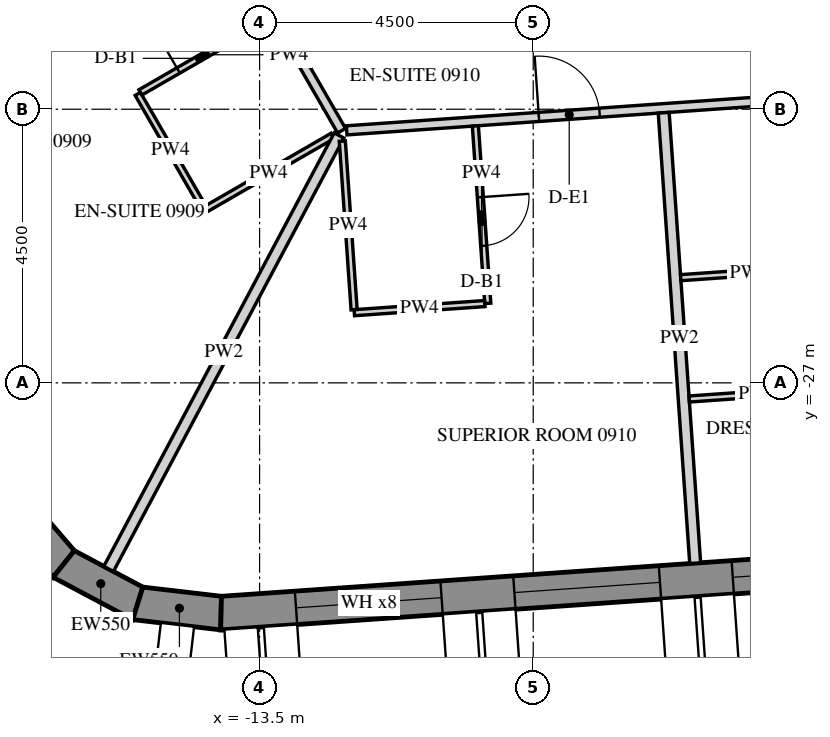
"""IFC4 building model, lengths in metres.
Left out: names, types, materials, properties, quantities, classifications, styles, units other than length and angle.
Written with IfcOpenShell. Run it as: python <this file> out.ifc"""

import sys

from ifc_helpers import new_model, si_unit, direction, frame, frame_2d, origin, place, context, subcontext, project, spatial, polyline, rectangle, outline, extrude, element, fill, save


model = new_model("IFC4")
c1 = context("Model", 3, precision=1e-05, world=origin(), true_north=direction((0.0, 1.0)))
c2 = subcontext(c1, "Body", "Model", "MODEL_VIEW")
j1 = project(units=[si_unit("LENGTHUNIT", "METRE"), si_unit("PLANEANGLEUNIT", "RADIAN")], contexts=[c1])
p1 = place(None, origin())
s1 = spatial("IfcSite", under=j1, at=p1, CompositionType="ELEMENT")
p2 = place(p1, origin())
s2 = spatial("IfcBuilding", under=s1, at=p2, CompositionType="ELEMENT")
p3 = place(p2, frame((0.0, 0.0, 123.3)))
s3 = spatial("IfcBuildingStorey", under=s2, at=p3, CompositionType="ELEMENT", Elevation=123.3)
p4 = place(p3, frame((-17.619, -28.932, -0.15), z_axis=(0.0, 0.0, 1.0), x_axis=(0.651621950847, -0.758543890078, 0.0)))
e1 = element("IfcWall", 1, at=p4, inside=s3, PredefinedType="SOLIDWALL", context=c2, shape_type="SweptSolid", body=[
    extrude(outline(polyline([(-0.026, -0.275), (1.431, -0.275), (1.327, 0.275), (0.026, 0.275), (-0.026, -0.275)])), origin(), (0.0, 0.0, 1.0), 3.9),
])
p5 = place(p3, frame((-16.721, -29.979, -0.15), z_axis=(0.0, 0.0, 1.0), x_axis=(0.882994189209, -0.469383917304, 0.0)))
e2 = element("IfcWall", 2, at=p5, inside=s3, PredefinedType="SOLIDWALL", context=c2, shape_type="SweptSolid", body=[
    extrude(outline(polyline([(-0.052, -0.275), (1.431, -0.275), (1.327, 0.275), (0.052, 0.275), (-0.052, -0.275)])), origin(), (0.0, 0.0, 1.0), 3.9),
])
p6 = place(p3, frame((-15.503, -30.626, -0.15), z_axis=(0.0, 0.0, 1.0), x_axis=(0.993232537394, -0.11614269956, 0.0)))
e3 = element("IfcWall", 3, at=p6, inside=s3, PredefinedType="SOLIDWALL", context=c2, shape_type="SweptSolid", body=[
    extrude(outline(polyline([(-0.052, -0.275), (1.405, -0.275), (1.353, 0.275), (0.052, 0.275), (-0.052, -0.275)])), origin(), (0.0, 0.0, 1.0), 3.9),
])
p7 = place(p3, frame((-14.134, -30.786, -0.15), z_axis=(0.0, 0.0, 1.0), x_axis=(0.997564037441, 0.069756657061, 0.0)))
e4 = element("IfcWall", 4, at=p7, inside=s3, PredefinedType="SOLIDWALL", context=c2, shape_type="SweptSolid", body=[
    extrude(outline(polyline([(-0.026, -0.275), (30.094, -0.275), (30.049, 0.275), (0.026, 0.275), (-0.026, -0.275)])), origin(), (0.0, 0.0, 1.0), 3.9),
])
p8 = place(p7, frame((1.236, 0.0, 1.05)))
e5 = element("IfcOpeningElement", 5, at=p8, cuts=e4, PredefinedType="OPENING", context=c2, shape_type="SweptSolid", body=[
    extrude(rectangle(XDim=2.4, YDim=2.4, at=frame_2d((1.2, 1.2))), frame((0.0, 0.285, 0.0), z_axis=(0.0, -1.0, 0.0), x_axis=(1.0, 0.0, 0.0)), (0.0, 0.0, 1.0), 0.57),
])
p9 = place(p7, frame((4.835, 0.0, 1.05)))
e6 = element("IfcOpeningElement", 6, at=p9, cuts=e4, PredefinedType="OPENING", context=c2, shape_type="SweptSolid", body=[
    extrude(rectangle(XDim=2.4, YDim=2.4, at=frame_2d((1.2, 1.2))), frame((0.0, 0.285, 0.0), z_axis=(0.0, -1.0, 0.0), x_axis=(1.0, 0.0, 0.0)), (0.0, 0.0, 1.0), 0.57),
])
p10 = place(p7, frame((8.436, 0.0, 1.05)))
e7 = element("IfcOpeningElement", 7, at=p10, cuts=e4, PredefinedType="OPENING", context=c2, shape_type="SweptSolid", body=[
    extrude(rectangle(XDim=2.4, YDim=2.4, at=frame_2d((1.2, 1.2))), frame((0.0, 0.285, 0.0), z_axis=(0.0, -1.0, 0.0), x_axis=(1.0, 0.0, 0.0)), (0.0, 0.0, 1.0), 0.57),
])
p11 = place(p7, frame((12.035, 0.0, 1.05)))
e8 = element("IfcOpeningElement", 8, at=p11, cuts=e4, PredefinedType="OPENING", context=c2, shape_type="SweptSolid", body=[
    extrude(rectangle(XDim=2.4, YDim=2.4, at=frame_2d((1.2, 1.2))), frame((0.0, 0.285, 0.0), z_axis=(0.0, -1.0, 0.0), x_axis=(1.0, 0.0, 0.0)), (0.0, 0.0, 1.0), 0.57),
])
p12 = place(p7, frame((15.635, 0.0, 1.05)))
e9 = element("IfcOpeningElement", 9, at=p12, cuts=e4, PredefinedType="OPENING", context=c2, shape_type="SweptSolid", body=[
    extrude(rectangle(XDim=2.4, YDim=2.4, at=frame_2d((1.2, 1.2))), frame((0.0, 0.285, 0.0), z_axis=(0.0, -1.0, 0.0), x_axis=(1.0, 0.0, 0.0)), (0.0, 0.0, 1.0), 0.57),
])
p13 = place(p7, frame((19.236, 0.0, 1.05)))
e10 = element("IfcOpeningElement", 10, at=p13, cuts=e4, PredefinedType="OPENING", context=c2, shape_type="SweptSolid", body=[
    extrude(rectangle(XDim=2.4, YDim=2.4, at=frame_2d((1.2, 1.2))), frame((0.0, 0.285, 0.0), z_axis=(0.0, -1.0, 0.0), x_axis=(1.0, 0.0, 0.0)), (0.0, 0.0, 1.0), 0.57),
])
p14 = place(p7, frame((22.835, 0.0, 1.05)))
e11 = element("IfcOpeningElement", 11, at=p14, cuts=e4, PredefinedType="OPENING", context=c2, shape_type="SweptSolid", body=[
    extrude(rectangle(XDim=2.4, YDim=2.4, at=frame_2d((1.2, 1.2))), frame((0.0, 0.285, 0.0), z_axis=(0.0, -1.0, 0.0), x_axis=(1.0, 0.0, 0.0)), (0.0, 0.0, 1.0), 0.57),
])
p15 = place(p7, frame((26.436, 0.0, 1.05)))
e12 = element("IfcOpeningElement", 12, at=p15, cuts=e4, PredefinedType="OPENING", context=c2, shape_type="SweptSolid", body=[
    extrude(rectangle(XDim=2.4, YDim=2.4, at=frame_2d((1.2, 1.2))), frame((0.0, 0.285, 0.0), z_axis=(0.0, -1.0, 0.0), x_axis=(1.0, 0.0, 0.0)), (0.0, 0.0, 1.0), 0.57),
])
p16 = place(p3, frame((-24.09, -2.175, 0.0), z_axis=(0.0, 0.0, 1.0), x_axis=(0.499996832073, -0.86602723278, 0.0)))
e13 = element("IfcWall", 13, at=p16, inside=s3, PredefinedType="PARTITIONING", context=c2, shape_type="SweptSolid", body=[
    extrude(rectangle(XDim=23.877, YDim=0.15, at=frame_2d((11.938, 0.0))), origin(), (0.0, 0.0, 1.0), 2.988),
])
p17 = place(p16, frame((6.343, 0.0, 0.0)))
e14 = element("IfcOpeningElement", 14, at=p17, cuts=e13, PredefinedType="OPENING", context=c2, shape_type="SweptSolid", body=[
    extrude(rectangle(XDim=1.0, YDim=2.1, at=frame_2d((0.5, 1.05))), frame((0.0, 0.085, 0.0), z_axis=(0.0, -1.0, 0.0), x_axis=(1.0, 0.0, 0.0)), (0.0, 0.0, 1.0), 0.17),
])
p18 = place(p16, frame((13.172, 0.0, 0.0)))
e15 = element("IfcOpeningElement", 15, at=p18, cuts=e13, PredefinedType="OPENING", context=c2, shape_type="SweptSolid", body=[
    extrude(rectangle(XDim=1.0, YDim=2.1, at=frame_2d((0.5, 1.05))), frame((0.0, 0.085, 0.0), z_axis=(0.0, -1.0, 0.0), x_axis=(1.0, 0.0, 0.0)), (0.0, 0.0, 1.0), 0.17),
])
p19 = place(p16, frame((19.625, 0.0, 0.0)))
e16 = element("IfcOpeningElement", 16, at=p19, cuts=e13, PredefinedType="OPENING", context=c2, shape_type="SweptSolid", body=[
    extrude(rectangle(XDim=1.0, YDim=2.1, at=frame_2d((0.5, 1.05))), frame((0.0, 0.085, 0.0), z_axis=(0.0, -1.0, 0.0), x_axis=(1.0, 0.0, 0.0)), (0.0, 0.0, 1.0), 0.17),
])
p20 = place(p3, frame((-12.068, -22.847, 0.0), z_axis=(0.0, 0.0, 1.0), x_axis=(0.99756437486, 0.069751831595, 0.0)))
e17 = element("IfcWall", 17, at=p20, inside=s3, PredefinedType="PARTITIONING", context=c2, shape_type="SweptSolid", body=[
    extrude(rectangle(XDim=22.002, YDim=0.15, at=frame_2d((11.001, 0.0))), origin(), (0.0, 0.0, 1.0), 2.988),
])
p21 = place(p20, frame((3.169, 0.0, 0.0)))
e18 = element("IfcOpeningElement", 18, at=p21, cuts=e17, PredefinedType="OPENING", context=c2, shape_type="SweptSolid", body=[
    extrude(rectangle(XDim=1.0, YDim=2.1, at=frame_2d((0.5, 1.05))), frame((0.0, 0.085, 0.0), z_axis=(0.0, -1.0, 0.0), x_axis=(1.0, 0.0, 0.0)), (0.0, 0.0, 1.0), 0.17),
])
p22 = place(p20, frame((13.121, 0.0, 0.0)))
e19 = element("IfcOpeningElement", 19, at=p22, cuts=e17, PredefinedType="OPENING", context=c2, shape_type="SweptSolid", body=[
    extrude(rectangle(XDim=1.0, YDim=2.1, at=frame_2d((0.5, 1.05))), frame((0.0, 0.085, 0.0), z_axis=(0.0, -1.0, 0.0), x_axis=(1.0, 0.0, 0.0)), (0.0, 0.0, 1.0), 0.17),
])
p23 = place(p20, frame((20.852, 0.0, 0.0)))
e20 = element("IfcOpeningElement", 20, at=p23, cuts=e17, PredefinedType="OPENING", context=c2, shape_type="SweptSolid", body=[
    extrude(rectangle(XDim=1.0, YDim=2.1, at=frame_2d((0.5, 1.05))), frame((0.0, 0.085, 0.0), z_axis=(0.0, -1.0, 0.0), x_axis=(1.0, 0.0, 0.0)), (0.0, 0.0, 1.0), 0.17),
])
p24 = place(p3, frame((-21.299, -22.009, 0.0), z_axis=(0.0, 0.0, 1.0), x_axis=(0.866014745021, 0.500018461065, 0.0)))
e21 = element("IfcWall", 21, at=p24, inside=s3, PredefinedType="PARTITIONING", context=c2, shape_type="SweptSolid", body=[
    extrude(rectangle(XDim=7.425, YDim=0.18, at=frame_2d((3.712, 0.0))), origin(), (0.0, 0.0, 1.0), 2.988),
])
p25 = place(p3, frame((-12.3, -22.939, 0.0), z_axis=(0.0, 0.0, 1.0), x_axis=(-0.866044985707, -0.499966081581, 0.0)))
e22 = element("IfcWall", 22, at=p25, inside=s3, PredefinedType="PARTITIONING", context=c2, shape_type="SweptSolid", body=[
    extrude(rectangle(XDim=2.429, YDim=0.1, at=frame_2d((1.214, 0.0))), origin(), (0.0, 0.0, 1.0), 2.988),
])
p26 = place(p3, frame((-14.428, -24.11, 0.0), z_axis=(0.0, 0.0, 1.0), x_axis=(-0.499961633463, 0.866047553582, 0.0)))
e23 = element("IfcWall", 23, at=p26, inside=s3, PredefinedType="PARTITIONING", context=c2, shape_type="SweptSolid", body=[
    extrude(rectangle(XDim=2.15, YDim=0.1, at=frame_2d((1.075, 0.0))), origin(), (0.0, 0.0, 1.0), 2.988),
])
p27 = place(p3, frame((-15.46, -22.223, 0.0), z_axis=(0.0, 0.0, 1.0), x_axis=(0.866031185235, 0.4999899861, 0.0)))
e24 = element("IfcWall", 24, at=p27, inside=s3, PredefinedType="PARTITIONING", context=c2, shape_type="SweptSolid", body=[
    extrude(rectangle(XDim=2.475, YDim=0.1, at=frame_2d((1.238, 0.0))), origin(), (0.0, 0.0, 1.0), 2.988),
])
p28 = place(p27, frame((0.72, 0.0, 0.0)))
e25 = element("IfcOpeningElement", 25, at=p28, cuts=e24, PredefinedType="OPENING", context=c2, shape_type="SweptSolid", body=[
    extrude(rectangle(XDim=0.8, YDim=2.1, at=frame_2d((0.4, 1.05))), frame((0.0, 0.06, 0.0), z_axis=(0.0, -1.0, 0.0), x_axis=(1.0, 0.0, 0.0)), (0.0, 0.0, 1.0), 0.12),
])
p29 = place(p3, frame((-15.983, -30.059, 0.0), z_axis=(0.0, 0.0, 1.0), x_axis=(0.469476547643, 0.882944942346, 0.0)))
e26 = element("IfcWall", 26, at=p29, inside=s3, PredefinedType="PARTITIONING", context=c2, shape_type="SweptSolid", body=[
    extrude(rectangle(XDim=8.073, YDim=0.18, at=frame_2d((4.037, 0.0))), origin(), (0.0, 0.0, 1.0), 2.988),
])
p30 = place(p3, frame((-9.951, -22.775, 0.0), z_axis=(0.0, 0.0, 1.0), x_axis=(0.069775971057, -0.997562686683, 0.0)))
e27 = element("IfcWall", 27, at=p30, inside=s3, PredefinedType="PARTITIONING", context=c2, shape_type="SweptSolid", body=[
    extrude(rectangle(XDim=2.925, YDim=0.1, at=frame_2d((1.462, 0.0))), origin(), (0.0, 0.0, 1.0), 2.988),
])
p31 = place(p30, frame((1.175, 0.0, 0.0)))
e28 = element("IfcOpeningElement", 28, at=p31, cuts=e27, PredefinedType="OPENING", context=c2, shape_type="SweptSolid", body=[
    extrude(rectangle(XDim=0.8, YDim=2.1, at=frame_2d((0.4, 1.05))), frame((0.0, 0.06, 0.0), z_axis=(0.0, -1.0, 0.0), x_axis=(1.0, 0.0, 0.0)), (0.0, 0.0, 1.0), 0.12),
])
p32 = place(p3, frame((-9.797, -25.696, 0.0), z_axis=(0.0, 0.0, 1.0), x_axis=(-0.997566475845, -0.069721777595, 0.0)))
e29 = element("IfcWall", 29, at=p32, inside=s3, PredefinedType="PARTITIONING", context=c2, shape_type="SweptSolid", body=[
    extrude(rectangle(XDim=2.15, YDim=0.1, at=frame_2d((1.075, 0.0))), origin(), (0.0, 0.0, 1.0), 2.988),
])
p33 = place(p3, frame((-11.946, -25.796, 0.0), z_axis=(0.0, 0.0, 1.0), x_axis=(-0.069754817075, 0.997564166104, 0.0)))
e30 = element("IfcWall", 30, at=p33, inside=s3, PredefinedType="PARTITIONING", context=c2, shape_type="SweptSolid", body=[
    extrude(rectangle(XDim=2.779, YDim=0.1, at=frame_2d((1.39, 0.0))), origin(), (0.0, 0.0, 1.0), 2.988),
])
p34 = place(p3, frame((-6.336, -29.965, 0.0), z_axis=(0.0, 0.0, 1.0), x_axis=(-0.06977252161, 0.997562927954, 0.0)))
e31 = element("IfcWall", 31, at=p34, inside=s3, PredefinedType="PARTITIONING", context=c2, shape_type="SweptSolid", body=[
    extrude(rectangle(XDim=7.425, YDim=0.18, at=frame_2d((3.712, 0.0))), origin(), (0.0, 0.0, 1.0), 2.988),
])
p35 = place(p3, frame((-4.18, -27.108, 0.0), z_axis=(0.0, 0.0, 1.0), x_axis=(-0.997561825928, -0.069788275888, 0.0)))
e32 = element("IfcWall", 32, at=p35, inside=s3, PredefinedType="PARTITIONING", context=c2, shape_type="SweptSolid", body=[
    extrude(rectangle(XDim=2.26, YDim=0.1, at=frame_2d((1.13, 0.0))), origin(), (0.0, 0.0, 1.0), 2.988),
])
p36 = place(p3, frame((-6.574, -25.27, 0.0), z_axis=(0.0, 0.0, 1.0), x_axis=(0.997562351999, 0.069780755754, 0.0)))
e33 = element("IfcWall", 33, at=p36, inside=s3, PredefinedType="PARTITIONING", context=c2, shape_type="SweptSolid", body=[
    extrude(rectangle(XDim=2.26, YDim=0.1, at=frame_2d((1.13, 0.0))), origin(), (0.0, 0.0, 1.0), 2.988),
])
p37 = place(p8, frame((0.0, 0.205, 0.0)))
e34 = element("IfcWindow", 34, at=p37, inside=s3, PartitioningType="DOUBLE_PANEL_VERTICAL", PredefinedType="WINDOW", context=c2, shape_type="SweptSolid", body=[
    extrude(rectangle(XDim=2.4, YDim=2.4, at=frame_2d((1.2, 1.2))), frame((0.0, 0.03, 0.0), z_axis=(0.0, -1.0, 0.0), x_axis=(1.0, 0.0, 0.0)), (0.0, 0.0, 1.0), 0.06),
])
fill(e5, e34)
p38 = place(p9, frame((0.0, 0.205, 0.0)))
e35 = element("IfcWindow", 35, at=p38, inside=s3, PartitioningType="DOUBLE_PANEL_VERTICAL", PredefinedType="WINDOW", context=c2, shape_type="SweptSolid", body=[
    extrude(rectangle(XDim=2.4, YDim=2.4, at=frame_2d((1.2, 1.2))), frame((0.0, 0.03, 0.0), z_axis=(0.0, -1.0, 0.0), x_axis=(1.0, 0.0, 0.0)), (0.0, 0.0, 1.0), 0.06),
])
fill(e6, e35)
p39 = place(p10, frame((0.0, 0.205, 0.0)))
e36 = element("IfcWindow", 36, at=p39, inside=s3, PartitioningType="DOUBLE_PANEL_VERTICAL", PredefinedType="WINDOW", context=c2, shape_type="SweptSolid", body=[
    extrude(rectangle(XDim=2.4, YDim=2.4, at=frame_2d((1.2, 1.2))), frame((0.0, 0.03, 0.0), z_axis=(0.0, -1.0, 0.0), x_axis=(1.0, 0.0, 0.0)), (0.0, 0.0, 1.0), 0.06),
])
fill(e7, e36)
p40 = place(p28, origin())
e37 = element("IfcDoor", 37, at=p40, inside=s3, OperationType="SINGLE_SWING_RIGHT", PredefinedType="DOOR", context=c2, shape_type="SweptSolid", body=[
    extrude(rectangle(XDim=0.8, YDim=2.1, at=frame_2d((0.4, 1.05))), frame((0.0, 0.025, 0.0), z_axis=(0.0, -1.0, 0.0), x_axis=(1.0, 0.0, 0.0)), (0.0, 0.0, 1.0), 0.05),
])
fill(e25, e37)
p41 = place(p21, origin())
e38 = element("IfcDoor", 38, at=p41, inside=s3, OperationType="SINGLE_SWING_LEFT", PredefinedType="DOOR", context=c2, shape_type="SweptSolid", body=[
    extrude(rectangle(XDim=1.0, YDim=2.1, at=frame_2d((0.5, 1.05))), frame((0.0, 0.025, 0.0), z_axis=(0.0, -1.0, 0.0), x_axis=(1.0, 0.0, 0.0)), (0.0, 0.0, 1.0), 0.05),
])
fill(e18, e38)
p42 = place(p31, origin())
e39 = element("IfcDoor", 39, at=p42, inside=s3, OperationType="SINGLE_SWING_LEFT", PredefinedType="DOOR", context=c2, shape_type="SweptSolid", body=[
    extrude(rectangle(XDim=0.8, YDim=2.1, at=frame_2d((0.4, 1.05))), frame((0.0, 0.025, 0.0), z_axis=(0.0, -1.0, 0.0), x_axis=(1.0, 0.0, 0.0)), (0.0, 0.0, 1.0), 0.05),
])
fill(e28, e39)
save(model, sys.argv[1])
